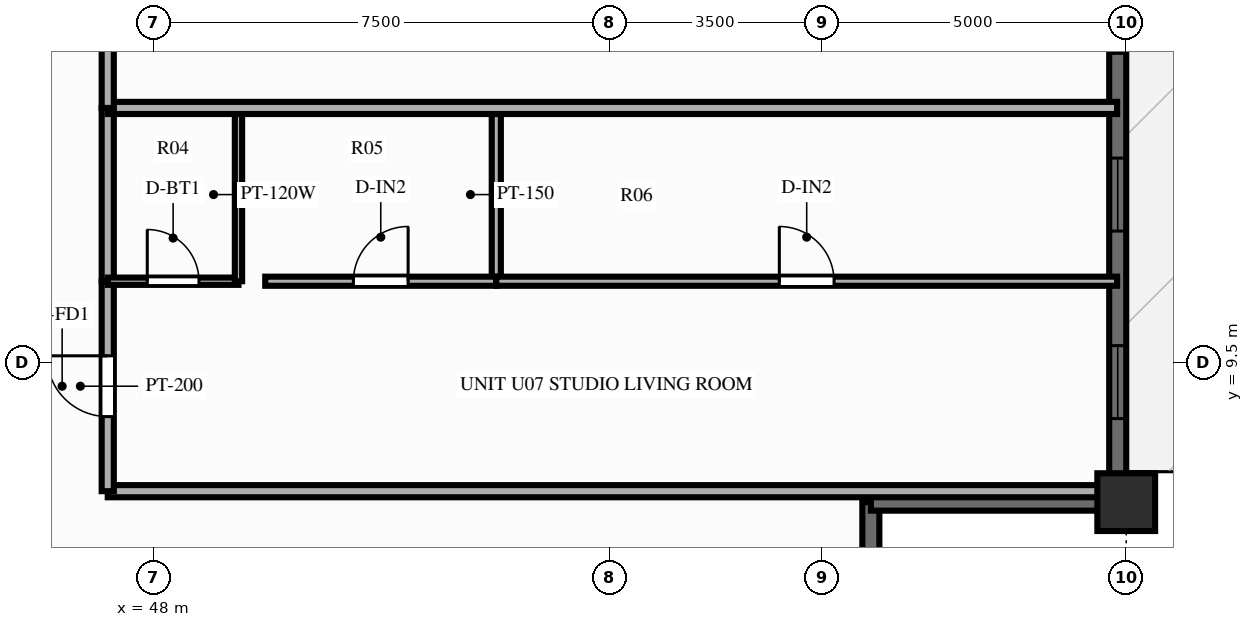
"""IFC4 building model, lengths in metres.
Left out: names, types, materials, properties, quantities, classifications, styles, units other than length and angle.
Written with IfcOpenShell. Run it as: python <this file> out.ifc"""

import sys

from ifc_helpers import new_model, si_unit, direction, frame, frame_2d, origin, origin_2d, place, context, subcontext, project, spatial, rectangle, extrude, source, transform, mapped, element, fill, save


model = new_model("IFC4")
c1 = context("Model", 3, precision=1e-05, world=origin(), true_north=direction((0.0, 1.0)))
c2 = subcontext(c1, "Body", "Model", "MODEL_VIEW")
j1 = project(units=[si_unit("LENGTHUNIT", "METRE"), si_unit("PLANEANGLEUNIT", "RADIAN")], contexts=[c1])
p1 = place(None, origin())
s1 = spatial("IfcSite", under=j1, at=p1, CompositionType="ELEMENT")
p2 = place(p1, origin())
s2 = spatial("IfcBuilding", under=s1, at=p2, CompositionType="ELEMENT")
p3 = place(p2, frame((0.0, 0.0, 92.85)))
s3 = spatial("IfcBuildingStorey", under=s2, at=p3, CompositionType="ELEMENT", Elevation=92.85)
m1 = source(origin(), c2, "Body", "SweptSolid", [
    extrude(rectangle(XDim=0.95, YDim=0.95, at=origin_2d()), origin(), (0.0, 0.0, 1.0), 3.0),
])
p4 = place(p3, frame((64.0, 7.2, 0.0), z_axis=(0.0, 0.0, 1.0), x_axis=(1.0, 0.0, 0.0)))
e1 = element("IfcColumn", 1, at=p4, inside=s3, PredefinedType="COLUMN", context=c2, shape_type="MappedRepresentation", body=[
    mapped(m1, transform((0.0, 0.0, 0.0), scale=1.0)),
])
p5 = place(p3, frame((63.86, 7.2, 0.0), z_axis=(0.0, 0.0, 1.0), x_axis=(0.0, 1.0, 0.0)))
e2 = element("IfcWall", 2, at=p5, inside=s3, PredefinedType="SOLIDWALL", context=c2, shape_type="SweptSolid", body=[
    extrude(rectangle(XDim=39.6, YDim=0.28, at=frame_2d((19.8, 0.0))), origin(), (0.0, 0.0, 1.0), 2.28),
])
p6 = place(p5, frame((1.374, 0.0, 0.25)))
e3 = element("IfcOpeningElement", 3, at=p6, cuts=e2, PredefinedType="OPENING", context=c2, shape_type="SweptSolid", body=[
    extrude(rectangle(XDim=1.2, YDim=1.5, at=frame_2d((0.6, 0.75))), frame((0.0, 0.152, 0.0), z_axis=(0.0, -1.0, 0.0), x_axis=(1.0, 0.0, 0.0)), (0.0, 0.0, 1.0), 0.304),
])
p7 = place(p5, frame((4.458, 0.0, 0.25)))
e4 = element("IfcOpeningElement", 4, at=p7, cuts=e2, PredefinedType="OPENING", context=c2, shape_type="SweptSolid", body=[
    extrude(rectangle(XDim=1.2, YDim=1.5, at=frame_2d((0.6, 0.75))), frame((0.0, 0.152, 0.0), z_axis=(0.0, -1.0, 0.0), x_axis=(1.0, 0.0, 0.0)), (0.0, 0.0, 1.0), 0.304),
])
p8 = place(p5, frame((7.382, 0.0, 0.25)))
e5 = element("IfcOpeningElement", 5, at=p8, cuts=e2, PredefinedType="OPENING", context=c2, shape_type="SweptSolid", body=[
    extrude(rectangle(XDim=1.2, YDim=1.5, at=frame_2d((0.6, 0.75))), frame((0.0, 0.152, 0.0), z_axis=(0.0, -1.0, 0.0), x_axis=(1.0, 0.0, 0.0)), (0.0, 0.0, 1.0), 0.304),
])
p9 = place(p5, frame((11.508, 0.0, 0.25)))
e6 = element("IfcOpeningElement", 6, at=p9, cuts=e2, PredefinedType="OPENING", context=c2, shape_type="SweptSolid", body=[
    extrude(rectangle(XDim=0.7, YDim=1.5, at=frame_2d((0.35, 0.75))), frame((0.0, 0.152, 0.0), z_axis=(0.0, -1.0, 0.0), x_axis=(1.0, 0.0, 0.0)), (0.0, 0.0, 1.0), 0.304),
])
p10 = place(p5, frame((13.409, 0.0, 0.25)))
e7 = element("IfcOpeningElement", 7, at=p10, cuts=e2, PredefinedType="OPENING", context=c2, shape_type="SweptSolid", body=[
    extrude(rectangle(XDim=1.2, YDim=1.5, at=frame_2d((0.6, 0.75))), frame((0.0, 0.152, 0.0), z_axis=(0.0, -1.0, 0.0), x_axis=(1.0, 0.0, 0.0)), (0.0, 0.0, 1.0), 0.304),
])
p11 = place(p5, frame((16.468, 0.0, 0.25)))
e8 = element("IfcOpeningElement", 8, at=p11, cuts=e2, PredefinedType="OPENING", context=c2, shape_type="SweptSolid", body=[
    extrude(rectangle(XDim=1.2, YDim=1.5, at=frame_2d((0.6, 0.75))), frame((0.0, 0.152, 0.0), z_axis=(0.0, -1.0, 0.0), x_axis=(1.0, 0.0, 0.0)), (0.0, 0.0, 1.0), 0.304),
])
p12 = place(p5, frame((19.2, 0.0, 0.25)))
e9 = element("IfcOpeningElement", 9, at=p12, cuts=e2, PredefinedType="OPENING", context=c2, shape_type="SweptSolid", body=[
    extrude(rectangle(XDim=1.2, YDim=1.5, at=frame_2d((0.6, 0.75))), frame((0.0, 0.152, 0.0), z_axis=(0.0, -1.0, 0.0), x_axis=(1.0, 0.0, 0.0)), (0.0, 0.0, 1.0), 0.304),
])
p13 = place(p5, frame((23.407, 0.0, 0.0), z_axis=(0.0, 0.0, 1.0), x_axis=(-1.0, 0.0, 0.0)))
e10 = element("IfcOpeningElement", 10, at=p13, cuts=e2, PredefinedType="OPENING", context=c2, shape_type="SweptSolid", body=[
    extrude(rectangle(XDim=1.6, YDim=2.15, at=frame_2d((0.8, 1.075))), frame((0.0, 0.152, 0.0), z_axis=(0.0, -1.0, 0.0), x_axis=(1.0, 0.0, 0.0)), (0.0, 0.0, 1.0), 0.304),
])
p14 = place(p5, frame((25.159, 0.0, 0.25)))
e11 = element("IfcOpeningElement", 11, at=p14, cuts=e2, PredefinedType="OPENING", context=c2, shape_type="SweptSolid", body=[
    extrude(rectangle(XDim=1.2, YDim=1.5, at=frame_2d((0.6, 0.75))), frame((0.0, 0.152, 0.0), z_axis=(0.0, -1.0, 0.0), x_axis=(1.0, 0.0, 0.0)), (0.0, 0.0, 1.0), 0.304),
])
p15 = place(p5, frame((27.484, 0.0, 0.25)))
e12 = element("IfcOpeningElement", 12, at=p15, cuts=e2, PredefinedType="OPENING", context=c2, shape_type="SweptSolid", body=[
    extrude(rectangle(XDim=0.7, YDim=1.5, at=frame_2d((0.35, 0.75))), frame((0.0, 0.152, 0.0), z_axis=(0.0, -1.0, 0.0), x_axis=(1.0, 0.0, 0.0)), (0.0, 0.0, 1.0), 0.304),
])
p16 = place(p5, frame((31.111, 0.0, 0.25)))
e13 = element("IfcOpeningElement", 13, at=p16, cuts=e2, PredefinedType="OPENING", context=c2, shape_type="SweptSolid", body=[
    extrude(rectangle(XDim=1.2, YDim=1.5, at=frame_2d((0.6, 0.75))), frame((0.0, 0.152, 0.0), z_axis=(0.0, -1.0, 0.0), x_axis=(1.0, 0.0, 0.0)), (0.0, 0.0, 1.0), 0.304),
])
p17 = place(p5, frame((34.109, 0.0, 0.25)))
e14 = element("IfcOpeningElement", 14, at=p17, cuts=e2, PredefinedType="OPENING", context=c2, shape_type="SweptSolid", body=[
    extrude(rectangle(XDim=1.2, YDim=1.5, at=frame_2d((0.6, 0.75))), frame((0.0, 0.152, 0.0), z_axis=(0.0, -1.0, 0.0), x_axis=(1.0, 0.0, 0.0)), (0.0, 0.0, 1.0), 0.304),
])
p18 = place(p5, frame((37.101, 0.0, 0.25)))
e15 = element("IfcOpeningElement", 15, at=p18, cuts=e2, PredefinedType="OPENING", context=c2, shape_type="SweptSolid", body=[
    extrude(rectangle(XDim=1.2, YDim=1.5, at=frame_2d((0.6, 0.75))), frame((0.0, 0.152, 0.0), z_axis=(0.0, -1.0, 0.0), x_axis=(1.0, 0.0, 0.0)), (0.0, 0.0, 1.0), 0.304),
])
for number, where, z_axis, x_axis in (
    (16, (59.8, 3.08, 0.0), (0.0, 0.0, 1.0), (0.0, 1.0, 0.0)),
    (17, (59.8, 7.2, 0.0), (0.0, 0.0, 1.0), (1.0, 0.0, 0.0)),
):
    element("IfcWall", number, at=place(p3, frame(where, z_axis=z_axis, x_axis=x_axis)), inside=s3, PredefinedType="SOLIDWALL", context=c2, shape_type="SweptSolid", body=[
        extrude(rectangle(XDim=4.12, YDim=0.28, at=frame_2d((2.06, 0.0))), origin(), (0.0, 0.0, 1.0), 2.28),
    ])
p19 = place(p3, frame((47.25, 7.38, 0.0), z_axis=(0.0, 0.0, 1.0), x_axis=(1.0, 0.0, 0.0)))
e18 = element("IfcWall", 18, at=p19, inside=s3, PredefinedType="PARTITIONING", context=c2, shape_type="SweptSolid", body=[
    extrude(rectangle(XDim=16.6, YDim=0.2, at=frame_2d((8.3, 0.0))), origin(), (0.0, 0.0, 1.0), 2.79),
])
p20 = place(p3, frame((47.25, 7.38, 0.0), z_axis=(0.0, 0.0, 1.0), x_axis=(0.0, 1.0, 0.0)))
e19 = element("IfcWall", 19, at=p20, inside=s3, PredefinedType="PARTITIONING", context=c2, shape_type="SweptSolid", body=[
    extrude(rectangle(XDim=3.454, YDim=0.2, at=frame_2d((1.727, 0.0))), origin(), (0.0, 0.0, 1.0), 2.79),
])
p21 = place(p20, frame((1.227, 0.0, 0.0)))
e20 = element("IfcOpeningElement", 20, at=p21, cuts=e19, PredefinedType="OPENING", context=c2, shape_type="SweptSolid", body=[
    extrude(rectangle(XDim=1.0, YDim=2.15, at=frame_2d((0.5, 1.075))), frame((0.0, 0.112, 0.0), z_axis=(0.0, -1.0, 0.0), x_axis=(1.0, 0.0, 0.0)), (0.0, 0.0, 1.0), 0.224),
])
p22 = place(p3, frame((47.25, 10.833, 0.0), z_axis=(0.0, 0.0, 1.0), x_axis=(0.0, 1.0, 0.0)))
e21 = element("IfcWall", 21, at=p22, inside=s3, PredefinedType="PARTITIONING", context=c2, shape_type="SweptSolid", body=[
    extrude(rectangle(XDim=2.85, YDim=0.2, at=frame_2d((1.425, 0.0))), origin(), (0.0, 0.0, 1.0), 2.79),
])
p23 = place(p3, frame((47.25, 10.833, 0.0), z_axis=(0.0, 0.0, 1.0), x_axis=(1.0, 0.0, 0.0)))
e22 = element("IfcWall", 22, at=p23, inside=s3, PredefinedType="PARTITIONING", context=c2, shape_type="SweptSolid", body=[
    extrude(rectangle(XDim=2.15, YDim=0.12, at=frame_2d((1.075, 0.0))), origin(), (0.0, 0.0, 1.0), 2.79),
])
p24 = place(p23, frame((0.65, 0.0, 0.0)))
e23 = element("IfcOpeningElement", 23, at=p24, cuts=e22, PredefinedType="OPENING", context=c2, shape_type="SweptSolid", body=[
    extrude(rectangle(XDim=0.85, YDim=2.05, at=frame_2d((0.425, 1.025))), frame((0.0, 0.072, 0.0), z_axis=(0.0, -1.0, 0.0), x_axis=(1.0, 0.0, 0.0)), (0.0, 0.0, 1.0), 0.144),
])
p25 = place(p3, frame((49.4, 10.833, 0.0), z_axis=(0.0, 0.0, 1.0), x_axis=(0.0, 1.0, 0.0)))
e24 = element("IfcWall", 24, at=p25, inside=s3, PredefinedType="PARTITIONING", context=c2, shape_type="SweptSolid", body=[
    extrude(rectangle(XDim=2.85, YDim=0.12, at=frame_2d((1.425, 0.0))), origin(), (0.0, 0.0, 1.0), 2.79),
])
p26 = place(p3, frame((53.64, 10.833, 0.0), z_axis=(0.0, 0.0, 1.0), x_axis=(0.0, 1.0, 0.0)))
e25 = element("IfcWall", 25, at=p26, inside=s3, PredefinedType="PARTITIONING", context=c2, shape_type="SweptSolid", body=[
    extrude(rectangle(XDim=2.85, YDim=0.15, at=frame_2d((1.425, 0.0))), origin(), (0.0, 0.0, 1.0), 2.79),
])
p27 = place(p3, frame((49.84, 10.833, 0.0), z_axis=(0.0, 0.0, 1.0), x_axis=(1.0, 0.0, 0.0)))
e26 = element("IfcWall", 26, at=p27, inside=s3, PredefinedType="PARTITIONING", context=c2, shape_type="SweptSolid", body=[
    extrude(rectangle(XDim=3.8, YDim=0.15, at=frame_2d((1.9, 0.0))), origin(), (0.0, 0.0, 1.0), 2.79),
])
p28 = place(p27, frame((1.45, 0.0, 0.0)))
e27 = element("IfcOpeningElement", 27, at=p28, cuts=e26, PredefinedType="OPENING", context=c2, shape_type="SweptSolid", body=[
    extrude(rectangle(XDim=0.9, YDim=2.1, at=frame_2d((0.45, 1.05))), frame((0.0, 0.087, 0.0), z_axis=(0.0, -1.0, 0.0), x_axis=(1.0, 0.0, 0.0)), (0.0, 0.0, 1.0), 0.174),
])
p29 = place(p3, frame((53.64, 10.833, 0.0), z_axis=(0.0, 0.0, 1.0), x_axis=(1.0, 0.0, 0.0)))
e28 = element("IfcWall", 28, at=p29, inside=s3, PredefinedType="PARTITIONING", context=c2, shape_type="SweptSolid", body=[
    extrude(rectangle(XDim=10.21, YDim=0.15, at=frame_2d((5.105, 0.0))), origin(), (0.0, 0.0, 1.0), 2.79),
])
p30 = place(p29, frame((4.655, 0.0, 0.0)))
e29 = element("IfcOpeningElement", 29, at=p30, cuts=e28, PredefinedType="OPENING", context=c2, shape_type="SweptSolid", body=[
    extrude(rectangle(XDim=0.9, YDim=2.1, at=frame_2d((0.45, 1.05))), frame((0.0, 0.087, 0.0), z_axis=(0.0, -1.0, 0.0), x_axis=(1.0, 0.0, 0.0)), (0.0, 0.0, 1.0), 0.174),
])
p31 = place(p3, frame((47.25, 13.684, 0.0), z_axis=(0.0, 0.0, 1.0), x_axis=(1.0, 0.0, 0.0)))
e30 = element("IfcWall", 30, at=p31, inside=s3, PredefinedType="PARTITIONING", context=c2, shape_type="SweptSolid", body=[
    extrude(rectangle(XDim=16.6, YDim=0.2, at=frame_2d((8.3, 0.0))), origin(), (0.0, 0.0, 1.0), 2.79),
])
p32 = place(p3, frame((47.25, 13.684, 0.0), z_axis=(0.0, 0.0, 1.0), x_axis=(0.0, 1.0, 0.0)))
e31 = element("IfcWall", 31, at=p32, inside=s3, PredefinedType="PARTITIONING", context=c2, shape_type="SweptSolid", body=[
    extrude(rectangle(XDim=2.996, YDim=0.2, at=frame_2d((1.498, 0.0))), origin(), (0.0, 0.0, 1.0), 2.79),
])
p33 = place(p32, frame((0.998, 0.0, 0.0)))
e32 = element("IfcOpeningElement", 32, at=p33, cuts=e31, PredefinedType="OPENING", context=c2, shape_type="SweptSolid", body=[
    extrude(rectangle(XDim=1.0, YDim=2.15, at=frame_2d((0.5, 1.075))), frame((0.0, 0.112, 0.0), z_axis=(0.0, -1.0, 0.0), x_axis=(1.0, 0.0, 0.0)), (0.0, 0.0, 1.0), 0.224),
])
m2 = source(origin(), c2, "Body", "SweptSolid", [
    extrude(rectangle(XDim=1.2, YDim=1.5, at=frame_2d((0.6, 0.75))), frame((0.0, 0.03, 0.0), z_axis=(0.0, -1.0, 0.0), x_axis=(1.0, 0.0, 0.0)), (0.0, 0.0, 1.0), 0.06),
])
p34 = place(p6, origin())
e33 = element("IfcWindow", 33, at=p34, inside=s3, PartitioningType="SINGLE_PANEL", PredefinedType="WINDOW", context=c2, shape_type="MappedRepresentation", body=[
    mapped(m2, transform((0.0, 0.0, 0.0), scale=1.0)),
])
fill(e3, e33)
p35 = place(p7, origin())
e34 = element("IfcWindow", 34, at=p35, inside=s3, PartitioningType="SINGLE_PANEL", PredefinedType="WINDOW", context=c2, shape_type="MappedRepresentation", body=[
    mapped(m2, transform((0.0, 0.0, 0.0), scale=1.0)),
])
fill(e4, e34)
p36 = place(p8, origin())
e35 = element("IfcWindow", 35, at=p36, inside=s3, PartitioningType="SINGLE_PANEL", PredefinedType="WINDOW", context=c2, shape_type="MappedRepresentation", body=[
    mapped(m2, transform((0.0, 0.0, 0.0), scale=1.0)),
])
fill(e5, e35)
m3 = source(origin(), c2, "Body", "SweptSolid", [
    extrude(rectangle(XDim=1.0, YDim=2.15, at=frame_2d((0.5, 1.075))), frame((0.0, 0.025, 0.0), z_axis=(0.0, -1.0, 0.0), x_axis=(1.0, 0.0, 0.0)), (0.0, 0.0, 1.0), 0.05),
])
p37 = place(p21, origin())
e36 = element("IfcDoor", 36, at=p37, inside=s3, OperationType="SINGLE_SWING_RIGHT", PredefinedType="DOOR", context=c2, shape_type="MappedRepresentation", body=[
    mapped(m3, transform((0.0, 0.0, 0.0), scale=1.0)),
])
fill(e20, e36)
m4 = source(origin(), c2, "Body", "SweptSolid", [
    extrude(rectangle(XDim=0.85, YDim=2.05, at=frame_2d((0.425, 1.025))), frame((0.0, 0.025, 0.0), z_axis=(0.0, -1.0, 0.0), x_axis=(1.0, 0.0, 0.0)), (0.0, 0.0, 1.0), 0.05),
])
p38 = place(p24, origin())
e37 = element("IfcDoor", 37, at=p38, inside=s3, OperationType="SINGLE_SWING_LEFT", PredefinedType="DOOR", context=c2, shape_type="MappedRepresentation", body=[
    mapped(m4, transform((0.0, 0.0, 0.0), scale=1.0)),
])
fill(e23, e37)
m5 = source(origin(), c2, "Body", "SweptSolid", [
    extrude(rectangle(XDim=0.9, YDim=2.1, at=frame_2d((0.45, 1.05))), frame((0.0, 0.025, 0.0), z_axis=(0.0, -1.0, 0.0), x_axis=(1.0, 0.0, 0.0)), (0.0, 0.0, 1.0), 0.05),
])
p39 = place(p28, origin())
e38 = element("IfcDoor", 38, at=p39, inside=s3, OperationType="SINGLE_SWING_RIGHT", PredefinedType="DOOR", context=c2, shape_type="MappedRepresentation", body=[
    mapped(m5, transform((0.0, 0.0, 0.0), scale=1.0)),
])
fill(e27, e38)
p40 = place(p30, origin())
e39 = element("IfcDoor", 39, at=p40, inside=s3, OperationType="SINGLE_SWING_LEFT", PredefinedType="DOOR", context=c2, shape_type="MappedRepresentation", body=[
    mapped(m5, transform((0.0, 0.0, 0.0), scale=1.0)),
])
fill(e29, e39)
save(model, sys.argv[1])
